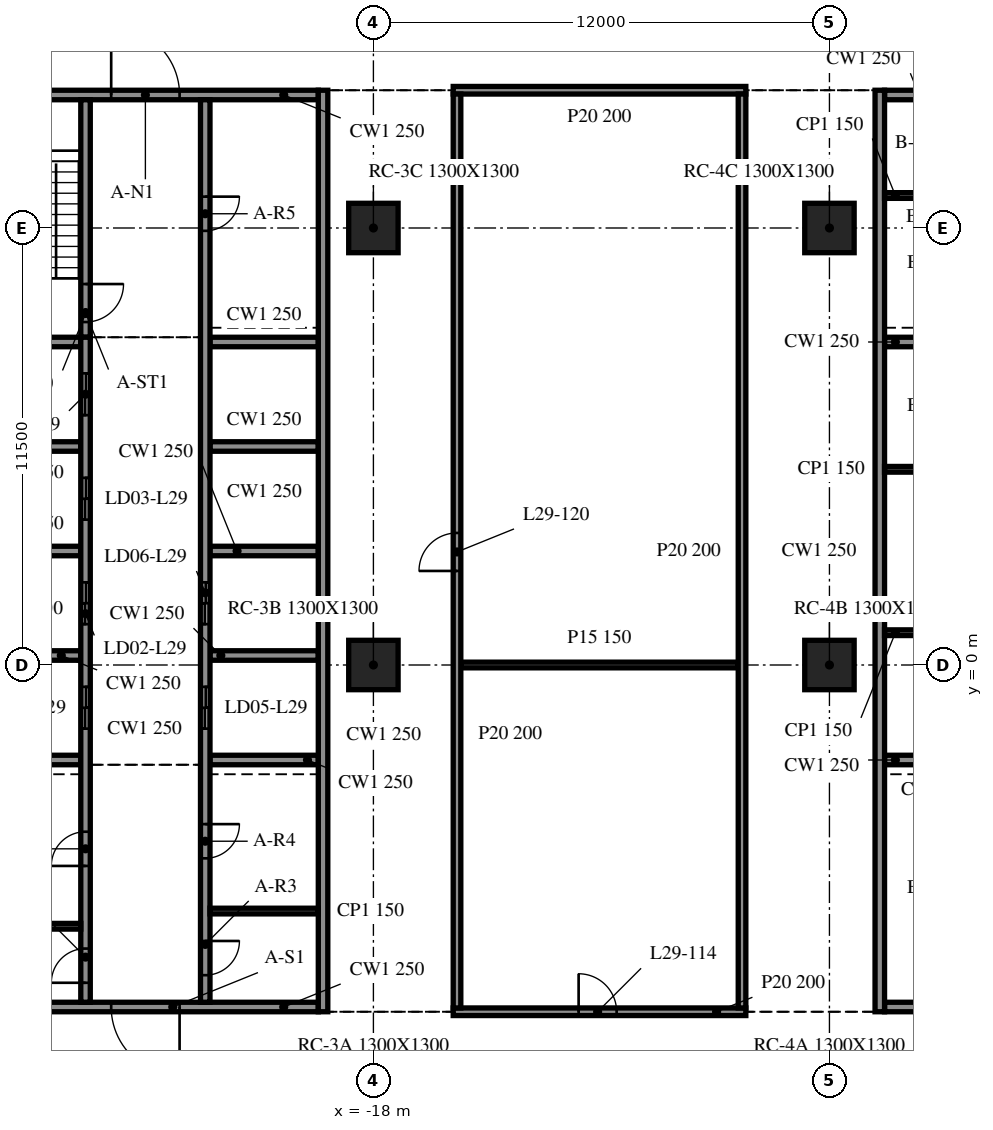
"""IFC4 building model, lengths in metres.
Left out: names, types, materials, properties, quantities, classifications, styles, units other than length and angle.
Written with IfcOpenShell. Run it as: python <this file> out.ifc"""

import sys

from ifc_helpers import new_model, si_unit, direction, frame, frame_2d, origin, origin_2d, place, context, subcontext, project, spatial, rectangle, extrude, element, fill, save


model = new_model("IFC4")
c1 = context("Model", 3, precision=1e-05, world=origin(), true_north=direction((0.0, 1.0)))
c2 = subcontext(c1, "Body", "Model", "MODEL_VIEW")
j1 = project(units=[si_unit("LENGTHUNIT", "METRE"), si_unit("PLANEANGLEUNIT", "RADIAN")], contexts=[c1])
p1 = place(None, origin())
s1 = spatial("IfcSite", under=j1, at=p1, CompositionType="ELEMENT")
p2 = place(p1, origin())
s2 = spatial("IfcBuilding", under=s1, at=p2, CompositionType="ELEMENT")
p3 = place(p2, frame((0.0, 0.0, 126.1)))
s3 = spatial("IfcBuildingStorey", under=s2, at=p3, CompositionType="ELEMENT", Elevation=126.1)
for number, where, z_axis, x_axis in (
    (1, (-18.0, 0.0, -0.34), (0.0, 0.0, 1.0), (1.0, 0.0, 0.0)),
    (2, (-18.0, 11.5, -0.34), (0.0, 0.0, 1.0), (1.0, 0.0, 0.0)),
    (3, (-6.0, 0.0, -0.34), (0.0, 0.0, 1.0), (1.0, 0.0, 0.0)),
    (4, (-6.0, 11.5, -0.34), (0.0, 0.0, 1.0), (1.0, 0.0, 0.0)),
):
    element("IfcColumn", number, at=place(p3, frame(where, z_axis=z_axis, x_axis=x_axis)), inside=s3, PredefinedType="COLUMN", context=c2, shape_type="SweptSolid", body=[
        extrude(rectangle(XDim=1.3, YDim=1.3, at=origin_2d()), origin(), (0.0, 0.0, 1.0), 4.1),
    ])
p4 = place(p3, frame((-19.325, -9.125, 0.0), z_axis=(0.0, 0.0, 1.0), x_axis=(0.0, 1.0, 0.0)))
e5 = element("IfcWall", 5, at=p4, inside=s3, PredefinedType="SOLIDWALL", context=c2, shape_type="SweptSolid", body=[
    extrude(rectangle(XDim=24.25, YDim=0.25, at=frame_2d((12.125, 0.0))), origin(), (0.0, 0.0, 1.0), 3.76),
])
p5 = place(p3, frame((-19.45, -9.0, 0.0), z_axis=(0.0, 0.0, 1.0), x_axis=(-1.0, 0.0, 0.0)))
e6 = element("IfcWall", 6, at=p5, inside=s3, PredefinedType="SOLIDWALL", context=c2, shape_type="SweptSolid", body=[
    extrude(rectangle(XDim=9.1, YDim=0.25, at=frame_2d((4.55, 0.0))), origin(), (0.0, 0.0, 1.0), 3.76),
])
p6 = place(p5, frame((3.65, 0.0, 0.0)))
e7 = element("IfcOpeningElement", 7, at=p6, cuts=e6, PredefinedType="OPENING", context=c2, shape_type="SweptSolid", body=[
    extrude(rectangle(XDim=1.8, YDim=2.1, at=frame_2d((0.9, 1.05))), frame((0.0, 0.135, 0.0), z_axis=(0.0, -1.0, 0.0), x_axis=(1.0, 0.0, 0.0)), (0.0, 0.0, 1.0), 0.27),
])
p7 = place(p3, frame((-28.55, 15.0, 0.0), z_axis=(0.0, 0.0, 1.0), x_axis=(1.0, 0.0, 0.0)))
e8 = element("IfcWall", 8, at=p7, inside=s3, PredefinedType="SOLIDWALL", context=c2, shape_type="SweptSolid", body=[
    extrude(rectangle(XDim=9.1, YDim=0.25, at=frame_2d((4.55, 0.0))), origin(), (0.0, 0.0, 1.0), 3.76),
])
p8 = place(p7, frame((3.65, 0.0, 0.0)))
e9 = element("IfcOpeningElement", 9, at=p8, cuts=e8, PredefinedType="OPENING", context=c2, shape_type="SweptSolid", body=[
    extrude(rectangle(XDim=1.8, YDim=2.1, at=frame_2d((0.9, 1.05))), frame((0.0, 0.135, 0.0), z_axis=(0.0, -1.0, 0.0), x_axis=(1.0, 0.0, 0.0)), (0.0, 0.0, 1.0), 0.27),
])
p9 = place(p3, frame((-25.575, -8.875, 0.0), z_axis=(0.0, 0.0, 1.0), x_axis=(0.0, 1.0, 0.0)))
e10 = element("IfcWall", 10, at=p9, inside=s3, PredefinedType="SOLIDWALL", context=c2, shape_type="SweptSolid", body=[
    extrude(rectangle(XDim=17.5, YDim=0.25, at=frame_2d((8.75, 0.0))), origin(), (0.0, 0.0, 1.0), 3.76),
])
p10 = place(p9, frame((7.2, 0.0, 0.0)))
e11 = element("IfcOpeningElement", 11, at=p10, cuts=e10, PredefinedType="OPENING", context=c2, shape_type="SweptSolid", body=[
    extrude(rectangle(XDim=1.1, YDim=2.1, at=frame_2d((0.55, 1.05))), frame((0.0, 0.135, 0.0), z_axis=(0.0, -1.0, 0.0), x_axis=(1.0, 0.0, 0.0)), (0.0, 0.0, 1.0), 0.27),
])
p11 = place(p9, frame((9.95, 0.0, 0.0)))
e12 = element("IfcOpeningElement", 12, at=p11, cuts=e10, PredefinedType="OPENING", context=c2, shape_type="SweptSolid", body=[
    extrude(rectangle(XDim=1.1, YDim=2.1, at=frame_2d((0.55, 1.05))), frame((0.0, 0.135, 0.0), z_axis=(0.0, -1.0, 0.0), x_axis=(1.0, 0.0, 0.0)), (0.0, 0.0, 1.0), 0.27),
])
p12 = place(p9, frame((12.7, 0.0, 0.0)))
e13 = element("IfcOpeningElement", 13, at=p12, cuts=e10, PredefinedType="OPENING", context=c2, shape_type="SweptSolid", body=[
    extrude(rectangle(XDim=1.1, YDim=2.1, at=frame_2d((0.55, 1.05))), frame((0.0, 0.135, 0.0), z_axis=(0.0, -1.0, 0.0), x_axis=(1.0, 0.0, 0.0)), (0.0, 0.0, 1.0), 0.27),
])
p13 = place(p9, frame((15.45, 0.0, 0.0)))
e14 = element("IfcOpeningElement", 14, at=p13, cuts=e10, PredefinedType="OPENING", context=c2, shape_type="SweptSolid", body=[
    extrude(rectangle(XDim=1.1, YDim=2.1, at=frame_2d((0.55, 1.05))), frame((0.0, 0.135, 0.0), z_axis=(0.0, -1.0, 0.0), x_axis=(1.0, 0.0, 0.0)), (0.0, 0.0, 1.0), 0.27),
])
p14 = place(p9, frame((0.512, 0.0, 0.0)))
e15 = element("IfcOpeningElement", 15, at=p14, cuts=e10, PredefinedType="OPENING", context=c2, shape_type="SweptSolid", body=[
    extrude(rectangle(XDim=0.9, YDim=2.1, at=frame_2d((0.45, 1.05))), frame((0.0, 0.135, 0.0), z_axis=(0.0, -1.0, 0.0), x_axis=(1.0, 0.0, 0.0)), (0.0, 0.0, 1.0), 0.27),
])
p15 = place(p9, frame((3.587, 0.0, 0.0)))
e16 = element("IfcOpeningElement", 16, at=p15, cuts=e10, PredefinedType="OPENING", context=c2, shape_type="SweptSolid", body=[
    extrude(rectangle(XDim=0.9, YDim=2.1, at=frame_2d((0.45, 1.05))), frame((0.0, 0.135, 0.0), z_axis=(0.0, -1.0, 0.0), x_axis=(1.0, 0.0, 0.0)), (0.0, 0.0, 1.0), 0.27),
])
p16 = place(p3, frame((-25.575, 14.875, 0.0), z_axis=(0.0, 0.0, 1.0), x_axis=(0.0, -1.0, 0.0)))
e17 = element("IfcWall", 17, at=p16, inside=s3, PredefinedType="SOLIDWALL", context=c2, shape_type="SweptSolid", body=[
    extrude(rectangle(XDim=6.25, YDim=0.25, at=frame_2d((3.125, 0.0))), origin(), (0.0, 0.0, 1.0), 3.76),
])
p17 = place(p16, frame((4.85, 0.0, 0.0)))
e18 = element("IfcOpeningElement", 18, at=p17, cuts=e17, PredefinedType="OPENING", context=c2, shape_type="SweptSolid", body=[
    extrude(rectangle(XDim=1.0, YDim=2.1, at=frame_2d((0.5, 1.05))), frame((0.0, 0.135, 0.0), z_axis=(0.0, -1.0, 0.0), x_axis=(1.0, 0.0, 0.0)), (0.0, 0.0, 1.0), 0.27),
])
p18 = place(p3, frame((-22.425, 14.875, 0.0), z_axis=(0.0, 0.0, 1.0), x_axis=(0.0, -1.0, 0.0)))
e19 = element("IfcWall", 19, at=p18, inside=s3, PredefinedType="SOLIDWALL", context=c2, shape_type="SweptSolid", body=[
    extrude(rectangle(XDim=23.75, YDim=0.25, at=frame_2d((11.875, 0.0))), origin(), (0.0, 0.0, 1.0), 3.76),
])
p19 = place(p18, frame((15.45, 0.0, 0.0)))
e20 = element("IfcOpeningElement", 20, at=p19, cuts=e19, PredefinedType="OPENING", context=c2, shape_type="SweptSolid", body=[
    extrude(rectangle(XDim=1.1, YDim=2.1, at=frame_2d((0.55, 1.05))), frame((0.0, 0.135, 0.0), z_axis=(0.0, -1.0, 0.0), x_axis=(1.0, 0.0, 0.0)), (0.0, 0.0, 1.0), 0.27),
])
p20 = place(p18, frame((12.7, 0.0, 0.0)))
e21 = element("IfcOpeningElement", 21, at=p20, cuts=e19, PredefinedType="OPENING", context=c2, shape_type="SweptSolid", body=[
    extrude(rectangle(XDim=1.1, YDim=2.1, at=frame_2d((0.55, 1.05))), frame((0.0, 0.135, 0.0), z_axis=(0.0, -1.0, 0.0), x_axis=(1.0, 0.0, 0.0)), (0.0, 0.0, 1.0), 0.27),
])
p21 = place(p18, frame((22.137, 0.0, 0.0)))
e22 = element("IfcOpeningElement", 22, at=p21, cuts=e19, PredefinedType="OPENING", context=c2, shape_type="SweptSolid", body=[
    extrude(rectangle(XDim=0.9, YDim=2.1, at=frame_2d((0.45, 1.05))), frame((0.0, 0.135, 0.0), z_axis=(0.0, -1.0, 0.0), x_axis=(1.0, 0.0, 0.0)), (0.0, 0.0, 1.0), 0.27),
])
p22 = place(p18, frame((19.062, 0.0, 0.0)))
e23 = element("IfcOpeningElement", 23, at=p22, cuts=e19, PredefinedType="OPENING", context=c2, shape_type="SweptSolid", body=[
    extrude(rectangle(XDim=0.9, YDim=2.1, at=frame_2d((0.45, 1.05))), frame((0.0, 0.135, 0.0), z_axis=(0.0, -1.0, 0.0), x_axis=(1.0, 0.0, 0.0)), (0.0, 0.0, 1.0), 0.27),
])
p23 = place(p18, frame((2.55, 0.0, 0.0)))
e24 = element("IfcOpeningElement", 24, at=p23, cuts=e19, PredefinedType="OPENING", context=c2, shape_type="SweptSolid", body=[
    extrude(rectangle(XDim=0.9, YDim=2.1, at=frame_2d((0.45, 1.05))), frame((0.0, 0.135, 0.0), z_axis=(0.0, -1.0, 0.0), x_axis=(1.0, 0.0, 0.0)), (0.0, 0.0, 1.0), 0.27),
])
for number, where, z_axis, x_axis in (
    (25, (-28.55, -2.5, 0.0), (0.0, 0.0, 1.0), (1.0, 0.0, 0.0)),
    (26, (-28.55, 0.25, 0.0), (0.0, 0.0, 1.0), (1.0, 0.0, 0.0)),
    (27, (-28.55, 3.0, 0.0), (0.0, 0.0, 1.0), (1.0, 0.0, 0.0)),
    (28, (-28.55, 5.75, 0.0), (0.0, 0.0, 1.0), (1.0, 0.0, 0.0)),
    (29, (-28.55, 8.5, 0.0), (0.0, 0.0, 1.0), (1.0, 0.0, 0.0)),
    (30, (-22.3, -2.5, 0.0), (0.0, 0.0, 1.0), (1.0, 0.0, 0.0)),
    (31, (-22.3, 0.25, 0.0), (0.0, 0.0, 1.0), (1.0, 0.0, 0.0)),
    (32, (-22.3, 3.0, 0.0), (0.0, 0.0, 1.0), (1.0, 0.0, 0.0)),
    (33, (-22.3, 5.75, 0.0), (0.0, 0.0, 1.0), (1.0, 0.0, 0.0)),
    (34, (-22.3, 8.5, 0.0), (0.0, 0.0, 1.0), (1.0, 0.0, 0.0)),
):
    element("IfcWall", number, at=place(p3, frame(where, z_axis=z_axis, x_axis=x_axis)), inside=s3, PredefinedType="SOLIDWALL", context=c2, shape_type="SweptSolid", body=[
        extrude(rectangle(XDim=2.85, YDim=0.25, at=frame_2d((1.425, 0.0))), origin(), (0.0, 0.0, 1.0), 3.76),
    ])
for number, where, z_axis, x_axis in (
    (35, (-28.55, -6.875, 0.0), (0.0, 0.0, 1.0), (1.0, 0.0, 0.0)),
    (36, (-22.3, -6.475, 0.0), (0.0, 0.0, 1.0), (1.0, 0.0, 0.0)),
):
    element("IfcWall", number, at=place(p3, frame(where, z_axis=z_axis, x_axis=x_axis)), inside=s3, PredefinedType="PARTITIONING", context=c2, shape_type="SweptSolid", body=[
        extrude(rectangle(XDim=2.85, YDim=0.15, at=frame_2d((1.425, 0.0))), origin(), (0.0, 0.0, 1.0), 3.76),
    ])
p24 = place(p3, frame((-4.675, 15.125, 0.0), z_axis=(0.0, 0.0, 1.0), x_axis=(0.0, -1.0, 0.0)))
e37 = element("IfcWall", 37, at=p24, inside=s3, PredefinedType="SOLIDWALL", context=c2, shape_type="SweptSolid", body=[
    extrude(rectangle(XDim=24.25, YDim=0.25, at=frame_2d((12.125, 0.0))), origin(), (0.0, 0.0, 1.0), 3.76),
])
p25 = place(p3, frame((4.55, -9.0, 0.0), z_axis=(0.0, 0.0, 1.0), x_axis=(-1.0, 0.0, 0.0)))
e38 = element("IfcWall", 38, at=p25, inside=s3, PredefinedType="SOLIDWALL", context=c2, shape_type="SweptSolid", body=[
    extrude(rectangle(XDim=9.1, YDim=0.25, at=frame_2d((4.55, 0.0))), origin(), (0.0, 0.0, 1.0), 3.76),
])
p26 = place(p25, frame((3.65, 0.0, 0.0)))
e39 = element("IfcOpeningElement", 39, at=p26, cuts=e38, PredefinedType="OPENING", context=c2, shape_type="SweptSolid", body=[
    extrude(rectangle(XDim=1.8, YDim=2.1, at=frame_2d((0.9, 1.05))), frame((0.0, 0.135, 0.0), z_axis=(0.0, -1.0, 0.0), x_axis=(1.0, 0.0, 0.0)), (0.0, 0.0, 1.0), 0.27),
])
p27 = place(p3, frame((-4.55, 15.0, 0.0), z_axis=(0.0, 0.0, 1.0), x_axis=(1.0, 0.0, 0.0)))
e40 = element("IfcWall", 40, at=p27, inside=s3, PredefinedType="SOLIDWALL", context=c2, shape_type="SweptSolid", body=[
    extrude(rectangle(XDim=9.1, YDim=0.25, at=frame_2d((4.55, 0.0))), origin(), (0.0, 0.0, 1.0), 3.76),
])
p28 = place(p27, frame((3.65, 0.0, 0.0)))
e41 = element("IfcOpeningElement", 41, at=p28, cuts=e40, PredefinedType="OPENING", context=c2, shape_type="SweptSolid", body=[
    extrude(rectangle(XDim=1.8, YDim=2.1, at=frame_2d((0.9, 1.05))), frame((0.0, 0.135, 0.0), z_axis=(0.0, -1.0, 0.0), x_axis=(1.0, 0.0, 0.0)), (0.0, 0.0, 1.0), 0.27),
])
for number, where, z_axis, x_axis in (
    (42, (-4.55, -2.5, 0.0), (0.0, 0.0, 1.0), (1.0, 0.0, 0.0)),
    (43, (-4.55, 8.5, 0.0), (0.0, 0.0, 1.0), (1.0, 0.0, 0.0)),
):
    element("IfcWall", number, at=place(p3, frame(where, z_axis=z_axis, x_axis=x_axis)), inside=s3, PredefinedType="SOLIDWALL", context=c2, shape_type="SweptSolid", body=[
        extrude(rectangle(XDim=2.85, YDim=0.25, at=frame_2d((1.425, 0.0))), origin(), (0.0, 0.0, 1.0), 3.76),
    ])
for number, where, z_axis, x_axis in (
    (44, (-4.55, 0.85, 0.0), (0.0, 0.0, 1.0), (1.0, 0.0, 0.0)),
    (45, (-4.55, 5.15, 0.0), (0.0, 0.0, 1.0), (1.0, 0.0, 0.0)),
    (46, (-4.55, 12.355, 0.0), (0.0, 0.0, 1.0), (1.0, 0.0, 0.0)),
):
    element("IfcWall", number, at=place(p3, frame(where, z_axis=z_axis, x_axis=x_axis)), inside=s3, PredefinedType="PARTITIONING", context=c2, shape_type="SweptSolid", body=[
        extrude(rectangle(XDim=2.85, YDim=0.15, at=frame_2d((1.425, 0.0))), origin(), (0.0, 0.0, 1.0), 3.76),
    ])
p29 = place(p3, frame((-15.9, -9.125, 0.0), z_axis=(0.0, 0.0, 1.0), x_axis=(1.0, 0.0, 0.0)))
e47 = element("IfcWall", 47, at=p29, inside=s3, PredefinedType="PARTITIONING", context=c2, shape_type="SweptSolid", body=[
    extrude(rectangle(XDim=7.7, YDim=0.2, at=frame_2d((3.85, 0.0))), origin(), (0.0, 0.0, 1.0), 3.76),
])
p30 = place(p29, frame((3.3, 0.0, 0.0)))
e48 = element("IfcOpeningElement", 48, at=p30, cuts=e47, PredefinedType="OPENING", context=c2, shape_type="SweptSolid", body=[
    extrude(rectangle(XDim=1.0, YDim=2.1, at=frame_2d((0.5, 1.05))), frame((0.0, 0.11, 0.0), z_axis=(0.0, -1.0, 0.0), x_axis=(1.0, 0.0, 0.0)), (0.0, 0.0, 1.0), 0.22),
])
p31 = place(p3, frame((-15.7, 0.0, 0.0), z_axis=(0.0, 0.0, 1.0), x_axis=(1.0, 0.0, 0.0)))
e49 = element("IfcWall", 49, at=p31, inside=s3, PredefinedType="PARTITIONING", context=c2, shape_type="SweptSolid", body=[
    extrude(rectangle(XDim=7.3, YDim=0.15, at=frame_2d((3.65, 0.0))), origin(), (0.0, 0.0, 1.0), 3.76),
])
p32 = place(p3, frame((-15.9, 15.125, 0.0), z_axis=(0.0, 0.0, 1.0), x_axis=(1.0, 0.0, 0.0)))
e50 = element("IfcWall", 50, at=p32, inside=s3, PredefinedType="PARTITIONING", context=c2, shape_type="SweptSolid", body=[
    extrude(rectangle(XDim=7.7, YDim=0.2, at=frame_2d((3.85, 0.0))), origin(), (0.0, 0.0, 1.0), 3.76),
])
p33 = place(p3, frame((-15.8, -9.025, 0.0), z_axis=(0.0, 0.0, 1.0), x_axis=(0.0, 1.0, 0.0)))
e51 = element("IfcWall", 51, at=p33, inside=s3, PredefinedType="PARTITIONING", context=c2, shape_type="SweptSolid", body=[
    extrude(rectangle(XDim=24.05, YDim=0.2, at=frame_2d((12.025, 0.0))), origin(), (0.0, 0.0, 1.0), 3.76),
])
p34 = place(p33, frame((11.5, 0.0, 0.0)))
e52 = element("IfcOpeningElement", 52, at=p34, cuts=e51, PredefinedType="OPENING", context=c2, shape_type="SweptSolid", body=[
    extrude(rectangle(XDim=1.0, YDim=2.1, at=frame_2d((0.5, 1.05))), frame((0.0, 0.11, 0.0), z_axis=(0.0, -1.0, 0.0), x_axis=(1.0, 0.0, 0.0)), (0.0, 0.0, 1.0), 0.22),
])
p35 = place(p3, frame((-8.3, -9.025, 0.0), z_axis=(0.0, 0.0, 1.0), x_axis=(0.0, 1.0, 0.0)))
e53 = element("IfcWall", 53, at=p35, inside=s3, PredefinedType="PARTITIONING", context=c2, shape_type="SweptSolid", body=[
    extrude(rectangle(XDim=24.05, YDim=0.2, at=frame_2d((12.025, 0.0))), origin(), (0.0, 0.0, 1.0), 3.76),
])
p36 = place(p6, origin())
e54 = element("IfcDoor", 54, at=p36, inside=s3, OperationType="DOUBLE_DOOR_SINGLE_SWING", PredefinedType="DOOR", context=c2, shape_type="SweptSolid", body=[
    extrude(rectangle(XDim=1.8, YDim=2.1, at=frame_2d((0.9, 1.05))), frame((0.0, 0.025, 0.0), z_axis=(0.0, -1.0, 0.0), x_axis=(1.0, 0.0, 0.0)), (0.0, 0.0, 1.0), 0.05),
])
fill(e7, e54)
p37 = place(p8, origin())
e55 = element("IfcDoor", 55, at=p37, inside=s3, OperationType="DOUBLE_DOOR_SINGLE_SWING", PredefinedType="DOOR", context=c2, shape_type="SweptSolid", body=[
    extrude(rectangle(XDim=1.8, YDim=2.1, at=frame_2d((0.9, 1.05))), frame((0.0, 0.025, 0.0), z_axis=(0.0, -1.0, 0.0), x_axis=(1.0, 0.0, 0.0)), (0.0, 0.0, 1.0), 0.05),
])
fill(e9, e55)
p38 = place(p19, origin())
e56 = element("IfcDoor", 56, at=p38, inside=s3, OperationType="DOUBLE_DOOR_SLIDING", PredefinedType="DOOR", context=c2, shape_type="SweptSolid", body=[
    extrude(rectangle(XDim=1.1, YDim=2.1, at=frame_2d((0.55, 1.05))), frame((0.0, 0.025, 0.0), z_axis=(0.0, -1.0, 0.0), x_axis=(1.0, 0.0, 0.0)), (0.0, 0.0, 1.0), 0.05),
])
fill(e20, e56)
p39 = place(p20, origin())
e57 = element("IfcDoor", 57, at=p39, inside=s3, OperationType="DOUBLE_DOOR_SLIDING", PredefinedType="DOOR", context=c2, shape_type="SweptSolid", body=[
    extrude(rectangle(XDim=1.1, YDim=2.1, at=frame_2d((0.55, 1.05))), frame((0.0, 0.025, 0.0), z_axis=(0.0, -1.0, 0.0), x_axis=(1.0, 0.0, 0.0)), (0.0, 0.0, 1.0), 0.05),
])
fill(e21, e57)
p40 = place(p10, origin())
e58 = element("IfcDoor", 58, at=p40, inside=s3, OperationType="DOUBLE_DOOR_SLIDING", PredefinedType="DOOR", context=c2, shape_type="SweptSolid", body=[
    extrude(rectangle(XDim=1.1, YDim=2.1, at=frame_2d((0.55, 1.05))), frame((0.0, 0.025, 0.0), z_axis=(0.0, -1.0, 0.0), x_axis=(1.0, 0.0, 0.0)), (0.0, 0.0, 1.0), 0.05),
])
fill(e11, e58)
p41 = place(p11, origin())
e59 = element("IfcDoor", 59, at=p41, inside=s3, OperationType="DOUBLE_DOOR_SLIDING", PredefinedType="DOOR", context=c2, shape_type="SweptSolid", body=[
    extrude(rectangle(XDim=1.1, YDim=2.1, at=frame_2d((0.55, 1.05))), frame((0.0, 0.025, 0.0), z_axis=(0.0, -1.0, 0.0), x_axis=(1.0, 0.0, 0.0)), (0.0, 0.0, 1.0), 0.05),
])
fill(e12, e59)
p42 = place(p12, origin())
e60 = element("IfcDoor", 60, at=p42, inside=s3, OperationType="DOUBLE_DOOR_SLIDING", PredefinedType="DOOR", context=c2, shape_type="SweptSolid", body=[
    extrude(rectangle(XDim=1.1, YDim=2.1, at=frame_2d((0.55, 1.05))), frame((0.0, 0.025, 0.0), z_axis=(0.0, -1.0, 0.0), x_axis=(1.0, 0.0, 0.0)), (0.0, 0.0, 1.0), 0.05),
])
fill(e13, e60)
p43 = place(p13, origin())
e61 = element("IfcDoor", 61, at=p43, inside=s3, OperationType="DOUBLE_DOOR_SLIDING", PredefinedType="DOOR", context=c2, shape_type="SweptSolid", body=[
    extrude(rectangle(XDim=1.1, YDim=2.1, at=frame_2d((0.55, 1.05))), frame((0.0, 0.025, 0.0), z_axis=(0.0, -1.0, 0.0), x_axis=(1.0, 0.0, 0.0)), (0.0, 0.0, 1.0), 0.05),
])
fill(e14, e61)
p44 = place(p14, origin())
e62 = element("IfcDoor", 62, at=p44, inside=s3, OperationType="SINGLE_SWING_LEFT", PredefinedType="DOOR", context=c2, shape_type="SweptSolid", body=[
    extrude(rectangle(XDim=0.9, YDim=2.1, at=frame_2d((0.45, 1.05))), frame((0.0, 0.025, 0.0), z_axis=(0.0, -1.0, 0.0), x_axis=(1.0, 0.0, 0.0)), (0.0, 0.0, 1.0), 0.05),
])
fill(e15, e62)
p45 = place(p15, origin())
e63 = element("IfcDoor", 63, at=p45, inside=s3, OperationType="SINGLE_SWING_RIGHT", PredefinedType="DOOR", context=c2, shape_type="SweptSolid", body=[
    extrude(rectangle(XDim=0.9, YDim=2.1, at=frame_2d((0.45, 1.05))), frame((0.0, 0.025, 0.0), z_axis=(0.0, -1.0, 0.0), x_axis=(1.0, 0.0, 0.0)), (0.0, 0.0, 1.0), 0.05),
])
fill(e16, e63)
p46 = place(p21, origin())
e64 = element("IfcDoor", 64, at=p46, inside=s3, OperationType="SINGLE_SWING_LEFT", PredefinedType="DOOR", context=c2, shape_type="SweptSolid", body=[
    extrude(rectangle(XDim=0.9, YDim=2.1, at=frame_2d((0.45, 1.05))), frame((0.0, 0.025, 0.0), z_axis=(0.0, -1.0, 0.0), x_axis=(1.0, 0.0, 0.0)), (0.0, 0.0, 1.0), 0.05),
])
fill(e22, e64)
p47 = place(p22, origin())
e65 = element("IfcDoor", 65, at=p47, inside=s3, OperationType="SINGLE_SWING_RIGHT", PredefinedType="DOOR", context=c2, shape_type="SweptSolid", body=[
    extrude(rectangle(XDim=0.9, YDim=2.1, at=frame_2d((0.45, 1.05))), frame((0.0, 0.025, 0.0), z_axis=(0.0, -1.0, 0.0), x_axis=(1.0, 0.0, 0.0)), (0.0, 0.0, 1.0), 0.05),
])
fill(e23, e65)
p48 = place(p23, origin())
e66 = element("IfcDoor", 66, at=p48, inside=s3, OperationType="SINGLE_SWING_LEFT", PredefinedType="DOOR", context=c2, shape_type="SweptSolid", body=[
    extrude(rectangle(XDim=0.9, YDim=2.1, at=frame_2d((0.45, 1.05))), frame((0.0, 0.025, 0.0), z_axis=(0.0, -1.0, 0.0), x_axis=(1.0, 0.0, 0.0)), (0.0, 0.0, 1.0), 0.05),
])
fill(e24, e66)
p49 = place(p17, origin())
e67 = element("IfcDoor", 67, at=p49, inside=s3, OperationType="SINGLE_SWING_RIGHT", PredefinedType="DOOR", context=c2, shape_type="SweptSolid", body=[
    extrude(rectangle(XDim=1.0, YDim=2.1, at=frame_2d((0.5, 1.05))), frame((0.0, 0.025, 0.0), z_axis=(0.0, -1.0, 0.0), x_axis=(1.0, 0.0, 0.0)), (0.0, 0.0, 1.0), 0.05),
])
fill(e18, e67)
p50 = place(p30, origin())
e68 = element("IfcDoor", 68, at=p50, inside=s3, OperationType="SINGLE_SWING_LEFT", PredefinedType="DOOR", context=c2, shape_type="SweptSolid", body=[
    extrude(rectangle(XDim=1.0, YDim=2.1, at=frame_2d((0.5, 1.05))), frame((0.0, 0.025, 0.0), z_axis=(0.0, -1.0, 0.0), x_axis=(1.0, 0.0, 0.0)), (0.0, 0.0, 1.0), 0.05),
])
fill(e48, e68)
p51 = place(p34, origin())
e69 = element("IfcDoor", 69, at=p51, inside=s3, OperationType="SINGLE_SWING_RIGHT", PredefinedType="DOOR", context=c2, shape_type="SweptSolid", body=[
    extrude(rectangle(XDim=1.0, YDim=2.1, at=frame_2d((0.5, 1.05))), frame((0.0, 0.025, 0.0), z_axis=(0.0, -1.0, 0.0), x_axis=(1.0, 0.0, 0.0)), (0.0, 0.0, 1.0), 0.05),
])
fill(e52, e69)
save(model, sys.argv[1])
